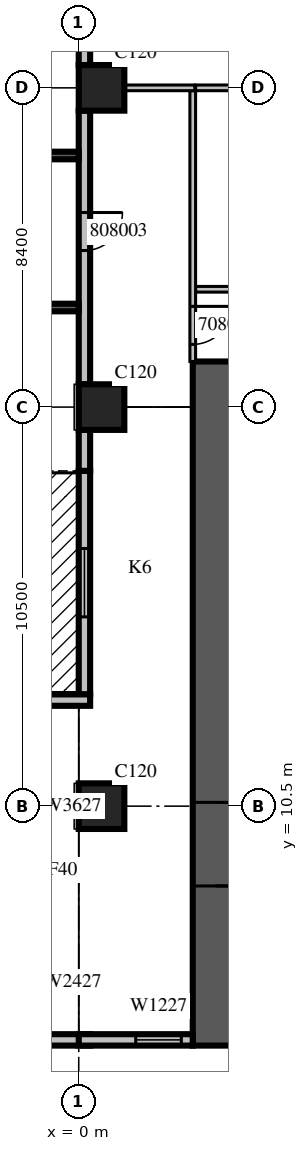
"""IFC4 building model, lengths in metres.
Left out: names, types, materials, properties, quantities, classifications, styles, units other than length and angle.
Written with IfcOpenShell. Run it as: python <this file> out.ifc"""

import sys

from ifc_helpers import new_model, si_unit, direction, frame, frame_2d, origin, origin_2d, place, context, subcontext, project, spatial, rectangle, extrude, source, transform, mapped, element, fill, save


model = new_model("IFC4")
c1 = context("Model", 3, precision=1e-05, world=origin(), true_north=direction((0.0, 1.0)))
c2 = subcontext(c1, "Body", "Model", "MODEL_VIEW")
j1 = project(units=[si_unit("LENGTHUNIT", "METRE"), si_unit("PLANEANGLEUNIT", "RADIAN")], contexts=[c1])
p1 = place(None, origin())
s1 = spatial("IfcSite", under=j1, at=p1, CompositionType="ELEMENT")
p2 = place(p1, origin())
s2 = spatial("IfcBuilding", under=s1, at=p2, CompositionType="ELEMENT")
p3 = place(p2, frame((0.0, 0.0, 44.7)))
s3 = spatial("IfcBuildingStorey", under=s2, at=p3, CompositionType="ELEMENT", Elevation=44.7)
m1 = source(origin(), c2, "Body", "SweptSolid", [
    extrude(rectangle(XDim=1.2, YDim=1.2, at=origin_2d()), origin(), (0.0, 0.0, 1.0), 4.2),
])
for number, where, z_axis, x_axis in (
    (1, (0.6, 10.5, 0.0), (0.0, 0.0, 1.0), (1.0, 0.0, 0.0)),
    (2, (0.6, 21.0, 0.0), (0.0, 0.0, 1.0), (1.0, 0.0, 0.0)),
    (3, (0.6, 29.4, 0.0), (0.0, 0.0, 1.0), (1.0, 0.0, 0.0)),
):
    element("IfcColumn", number, at=place(p3, frame(where, z_axis=z_axis, x_axis=x_axis)), inside=s3, PredefinedType="COLUMN", context=c2, shape_type="MappedRepresentation", body=[
        mapped(m1, transform((0.0, 0.0, 0.0), scale=1.0)),
    ])
m2 = source(origin(), c2, "Body", "SweptSolid", [
    extrude(rectangle(XDim=18.0, YDim=1.2, at=frame_2d((9.0, 0.0))), origin(), (0.0, 0.0, 1.0), 4.2),
])
p4 = place(p3, frame((3.6, 4.2, 0.0), z_axis=(0.0, 0.0, 1.0), x_axis=(0.0, 1.0, 0.0)))
e4 = element("IfcWall", 4, at=p4, inside=s3, PredefinedType="SHEAR", context=c2, shape_type="MappedRepresentation", body=[
    mapped(m2, transform((0.0, 0.0, 0.0), scale=1.0)),
])
m3 = source(origin(), c2, "Body", "SweptSolid", [
    extrude(rectangle(XDim=2.2, YDim=2.1, at=frame_2d((1.1, 1.05))), frame((0.0, 0.61, 0.0), z_axis=(0.0, -1.0, 0.0), x_axis=(1.0, 0.0, 0.0)), (0.0, 0.0, 1.0), 1.22),
])
p5 = place(p4, frame((4.2, 0.0, 0.0)))
e5 = element("IfcOpeningElement", 5, at=p5, cuts=e4, PredefinedType="OPENING", context=c2, shape_type="MappedRepresentation", body=[
    mapped(m3, transform((0.0, 0.0, 0.0), scale=1.0)),
])
m4 = source(origin(), c2, "Body", "SweptSolid", [
    extrude(rectangle(XDim=7.2, YDim=0.3, at=frame_2d((3.6, 0.0))), origin(), (0.0, 0.0, 1.0), 3.8),
])
p6 = place(p3, frame((0.15, 37.2, 0.0), z_axis=(0.0, 0.0, 1.0), x_axis=(0.0, -1.0, 0.0)))
e6 = element("IfcWall", 6, at=p6, inside=s3, PredefinedType="STANDARD", context=c2, shape_type="MappedRepresentation", body=[
    mapped(m4, transform((0.0, 0.0, 0.0), scale=1.0)),
])
m5 = source(origin(), c2, "Body", "SweptSolid", [
    extrude(rectangle(XDim=1.8, YDim=2.7, at=frame_2d((0.9, 1.35))), frame((0.0, 0.16, 0.0), z_axis=(0.0, -1.0, 0.0), x_axis=(1.0, 0.0, 0.0)), (0.0, 0.0, 1.0), 0.32),
])
p7 = place(p6, frame((0.738, 0.0, 0.6)))
e7 = element("IfcOpeningElement", 7, at=p7, cuts=e6, PredefinedType="OPENING", context=c2, shape_type="MappedRepresentation", body=[
    mapped(m5, transform((0.0, 0.0, 0.0), scale=1.0)),
])
m6 = source(origin(), c2, "Body", "SweptSolid", [
    extrude(rectangle(XDim=2.4, YDim=2.7, at=frame_2d((1.2, 1.35))), frame((0.0, 0.16, 0.0), z_axis=(0.0, -1.0, 0.0), x_axis=(1.0, 0.0, 0.0)), (0.0, 0.0, 1.0), 0.32),
])
p8 = place(p6, frame((3.7, 0.0, 0.6)))
e8 = element("IfcOpeningElement", 8, at=p8, cuts=e6, PredefinedType="OPENING", context=c2, shape_type="MappedRepresentation", body=[
    mapped(m6, transform((0.0, 0.0, 0.0), scale=1.0)),
])
p9 = place(p3, frame((0.15, 28.8, 0.0), z_axis=(0.0, 0.0, 1.0), x_axis=(0.0, -1.0, 0.0)))
e9 = element("IfcWall", 9, at=p9, inside=s3, PredefinedType="STANDARD", context=c2, shape_type="MappedRepresentation", body=[
    mapped(m4, transform((0.0, 0.0, 0.0), scale=1.0)),
])
m7 = source(origin(), c2, "Body", "SweptSolid", [
    extrude(rectangle(XDim=1.0, YDim=2.1, at=frame_2d((0.5, 1.05))), frame((0.0, 0.16, 0.0), z_axis=(0.0, -1.0, 0.0), x_axis=(1.0, 0.0, 0.0)), (0.0, 0.0, 1.0), 0.32),
])
p10 = place(p9, frame((2.68, 0.0, 0.0)))
e10 = element("IfcOpeningElement", 10, at=p10, cuts=e9, PredefinedType="OPENING", context=c2, shape_type="MappedRepresentation", body=[
    mapped(m7, transform((0.0, 0.0, 0.0), scale=1.0)),
])
m8 = source(origin(), c2, "Body", "SweptSolid", [
    extrude(rectangle(XDim=1.08, YDim=0.3, at=frame_2d((0.54, 0.0))), origin(), (0.0, 0.0, 1.0), 3.8),
])
p11 = place(p3, frame((0.15, 20.4, 0.0), z_axis=(0.0, 0.0, 1.0), x_axis=(0.0, -1.0, 0.0)))
e11 = element("IfcWall", 11, at=p11, inside=s3, PredefinedType="STANDARD", context=c2, shape_type="MappedRepresentation", body=[
    mapped(m8, transform((0.0, 0.0, 0.0), scale=1.0)),
])
m9 = source(origin(), c2, "Body", "SweptSolid", [
    extrude(rectangle(XDim=5.88, YDim=0.3, at=frame_2d((2.94, 0.0))), origin(), (0.0, 0.0, 1.0), 3.8),
])
p12 = place(p3, frame((0.15, 19.32, 0.0), z_axis=(0.0, 0.0, 1.0), x_axis=(0.0, -1.0, 0.0)))
e12 = element("IfcWall", 12, at=p12, inside=s3, PredefinedType="STANDARD", context=c2, shape_type="MappedRepresentation", body=[
    mapped(m9, transform((0.0, 0.0, 0.0), scale=1.0)),
])
m10 = source(origin(), c2, "Body", "SweptSolid", [
    extrude(rectangle(XDim=1.8, YDim=2.4, at=frame_2d((0.9, 1.2))), frame((0.0, 0.16, 0.0), z_axis=(0.0, -1.0, 0.0), x_axis=(1.0, 0.0, 0.0)), (0.0, 0.0, 1.0), 0.32),
])
p13 = place(p12, frame((2.04, 0.0, 0.0)))
e13 = element("IfcOpeningElement", 13, at=p13, cuts=e12, PredefinedType="OPENING", context=c2, shape_type="MappedRepresentation", body=[
    mapped(m10, transform((0.0, 0.0, 0.0), scale=1.0)),
])
m11 = source(origin(), c2, "Body", "SweptSolid", [
    extrude(rectangle(XDim=1.2, YDim=0.3, at=frame_2d((0.6, 0.0))), origin(), (0.0, 0.0, 1.0), 3.8),
])
for number, where, z_axis, x_axis in (
    (14, (0.3, 13.29, 0.0), (0.0, 0.0, 1.0), (-1.0, 0.0, 0.0)),
    (15, (0.3, 4.35, 0.0), (0.0, 0.0, 1.0), (-1.0, 0.0, 0.0)),
):
    element("IfcWall", number, at=place(p3, frame(where, z_axis=z_axis, x_axis=x_axis)), inside=s3, PredefinedType="STANDARD", context=c2, shape_type="MappedRepresentation", body=[
        mapped(m11, transform((0.0, 0.0, 0.0), scale=1.0)),
    ])
m12 = source(origin(), c2, "Body", "SweptSolid", [
    extrude(rectangle(XDim=3.0, YDim=0.3, at=frame_2d((1.5, 0.0))), origin(), (0.0, 0.0, 1.0), 3.8),
])
p14 = place(p3, frame((0.0, 4.35, 0.0), z_axis=(0.0, 0.0, 1.0), x_axis=(1.0, 0.0, 0.0)))
e16 = element("IfcWall", 16, at=p14, inside=s3, PredefinedType="STANDARD", context=c2, shape_type="MappedRepresentation", body=[
    mapped(m12, transform((0.0, 0.0, 0.0), scale=1.0)),
])
m13 = source(origin(), c2, "Body", "SweptSolid", [
    extrude(rectangle(XDim=1.2, YDim=2.7, at=frame_2d((0.6, 1.35))), frame((0.0, 0.16, 0.0), z_axis=(0.0, -1.0, 0.0), x_axis=(1.0, 0.0, 0.0)), (0.0, 0.0, 1.0), 0.32),
])
p15 = place(p14, frame((1.5, 0.0, 0.6)))
e17 = element("IfcOpeningElement", 17, at=p15, cuts=e16, PredefinedType="OPENING", context=c2, shape_type="MappedRepresentation", body=[
    mapped(m13, transform((0.0, 0.0, 0.0), scale=1.0)),
])
m14 = source(origin(), c2, "Body", "SweptSolid", [
    extrude(rectangle(XDim=3.9, YDim=0.2, at=frame_2d((1.95, 0.0))), origin(), (0.0, 0.0, 1.0), 3.79),
])
p16 = place(p3, frame((0.0, 27.62, 0.0), z_axis=(0.0, 0.0, 1.0), x_axis=(-1.0, 0.0, 0.0)))
e18 = element("IfcWall", 18, at=p16, inside=s3, PredefinedType="SOLIDWALL", context=c2, shape_type="MappedRepresentation", body=[
    mapped(m14, transform((0.0, 0.0, 0.0), scale=1.0)),
])
m15 = source(origin(), c2, "Body", "SweptSolid", [
    extrude(rectangle(XDim=2.4, YDim=2.7, at=frame_2d((1.2, 1.35))), frame((0.0, 0.11, 0.0), z_axis=(0.0, -1.0, 0.0), x_axis=(1.0, 0.0, 0.0)), (0.0, 0.0, 1.0), 0.22),
])
p17 = place(p16, frame((0.75, 0.0, 0.6)))
e19 = element("IfcOpeningElement", 19, at=p17, cuts=e18, PredefinedType="OPENING", context=c2, shape_type="MappedRepresentation", body=[
    mapped(m15, transform((0.0, 0.0, 0.0), scale=1.0)),
])
p18 = place(p3, frame((0.0, 23.62, 0.0), z_axis=(0.0, 0.0, 1.0), x_axis=(-1.0, 0.0, 0.0)))
e20 = element("IfcWall", 20, at=p18, inside=s3, PredefinedType="SOLIDWALL", context=c2, shape_type="MappedRepresentation", body=[
    mapped(m14, transform((0.0, 0.0, 0.0), scale=1.0)),
])
p19 = place(p18, frame((0.75, 0.0, 0.6)))
e21 = element("IfcOpeningElement", 21, at=p19, cuts=e20, PredefinedType="OPENING", context=c2, shape_type="MappedRepresentation", body=[
    mapped(m15, transform((0.0, 0.0, 0.0), scale=1.0)),
])
m16 = source(origin(), c2, "Body", "SweptSolid", [
    extrude(rectangle(XDim=11.925, YDim=0.15, at=frame_2d((5.963, 0.0))), origin(), (0.0, 0.0, 1.0), 3.8),
])
p20 = place(p3, frame((3.075, 24.1, 0.0), z_axis=(0.0, 0.0, 1.0), x_axis=(1.0, 0.0, 0.0)))
e22 = element("IfcWall", 22, at=p20, inside=s3, PredefinedType="PARTITIONING", context=c2, shape_type="MappedRepresentation", body=[
    mapped(m16, transform((0.0, 0.0, 0.0), scale=1.0)),
])
m17 = source(origin(), c2, "Body", "SweptSolid", [
    extrude(rectangle(XDim=0.9, YDim=2.1, at=frame_2d((0.45, 1.05))), frame((0.0, 0.085, 0.0), z_axis=(0.0, -1.0, 0.0), x_axis=(1.0, 0.0, 0.0)), (0.0, 0.0, 1.0), 0.17),
])
p21 = place(p20, frame((2.663, 0.0, 0.0)))
e23 = element("IfcOpeningElement", 23, at=p21, cuts=e22, PredefinedType="OPENING", context=c2, shape_type="MappedRepresentation", body=[
    mapped(m17, transform((0.0, 0.0, 0.0), scale=1.0)),
])
p22 = place(p20, frame((9.5, 0.0, 0.0)))
e24 = element("IfcOpeningElement", 24, at=p22, cuts=e22, PredefinedType="OPENING", context=c2, shape_type="MappedRepresentation", body=[
    mapped(m17, transform((0.0, 0.0, 0.0), scale=1.0)),
])
m18 = source(origin(), c2, "Body", "SweptSolid", [
    extrude(rectangle(XDim=6.826, YDim=0.15, at=frame_2d((3.413, 0.0))), origin(), (0.0, 0.0, 1.0), 3.8),
])
p23 = place(p3, frame((9.901, 29.4, 0.0), z_axis=(0.0, 0.0, 1.0), x_axis=(-1.0, 0.0, 0.0)))
e25 = element("IfcWall", 25, at=p23, inside=s3, PredefinedType="PARTITIONING", context=c2, shape_type="MappedRepresentation", body=[
    mapped(m18, transform((0.0, 0.0, 0.0), scale=1.0)),
])
m19 = source(origin(), c2, "Body", "SweptSolid", [
    extrude(rectangle(XDim=7.125, YDim=0.15, at=frame_2d((3.562, 0.0))), origin(), (0.0, 0.0, 1.0), 3.8),
])
p24 = place(p3, frame((3.0, 29.325, 0.0), z_axis=(0.0, 0.0, 1.0), x_axis=(0.0, -1.0, 0.0)))
e26 = element("IfcWall", 26, at=p24, inside=s3, PredefinedType="PARTITIONING", context=c2, shape_type="MappedRepresentation", body=[
    mapped(m19, transform((0.0, 0.0, 0.0), scale=1.0)),
])
m20 = source(origin(), c2, "Body", "SweptSolid", [
    extrude(rectangle(XDim=1.0, YDim=2.1, at=frame_2d((0.5, 1.05))), frame((0.0, 0.085, 0.0), z_axis=(0.0, -1.0, 0.0), x_axis=(1.0, 0.0, 0.0)), (0.0, 0.0, 1.0), 0.17),
])
p25 = place(p24, frame((5.675, 0.0, 0.0)))
e27 = element("IfcOpeningElement", 27, at=p25, cuts=e26, PredefinedType="OPENING", context=c2, shape_type="MappedRepresentation", body=[
    mapped(m20, transform((0.0, 0.0, 0.0), scale=1.0)),
])
m21 = source(origin(), c2, "Body", "SweptSolid", [
    extrude(rectangle(XDim=1.856, YDim=0.15, at=frame_2d((0.928, 0.0))), origin(), (0.0, 0.0, 1.0), 3.8),
])
p26 = place(p3, frame((3.055, 29.4, 0.0), z_axis=(0.0, 0.0, 1.0), x_axis=(-1.0, 0.0, 0.0)))
e28 = element("IfcWall", 28, at=p26, inside=s3, PredefinedType="PARTITIONING", context=c2, shape_type="MappedRepresentation", body=[
    mapped(m21, transform((0.0, 0.0, 0.0), scale=1.0)),
])
m22 = source(origin(), c2, "Body", "SweptSolid", [
    extrude(rectangle(XDim=1.8, YDim=2.4, at=frame_2d((0.9, 1.2))), frame((0.0, 0.025, 0.0), z_axis=(0.0, -1.0, 0.0), x_axis=(1.0, 0.0, 0.0)), (0.0, 0.0, 1.0), 0.05),
])
p27 = place(p13, origin())
e29 = element("IfcDoor", 29, at=p27, inside=s3, OperationType="SLIDING_TO_LEFT", PredefinedType="DOOR", context=c2, shape_type="MappedRepresentation", body=[
    mapped(m22, transform((0.0, 0.0, 0.0), scale=1.0)),
])
fill(e13, e29)
m23 = source(origin(), c2, "Body", "SweptSolid", [
    extrude(rectangle(XDim=1.2, YDim=2.7, at=frame_2d((0.6, 1.35))), frame((0.0, 0.03, 0.0), z_axis=(0.0, -1.0, 0.0), x_axis=(1.0, 0.0, 0.0)), (0.0, 0.0, 1.0), 0.06),
])
p28 = place(p15, origin())
e30 = element("IfcWindow", 30, at=p28, inside=s3, PartitioningType="SINGLE_PANEL", PredefinedType="WINDOW", context=c2, shape_type="MappedRepresentation", body=[
    mapped(m23, transform((0.0, 0.0, 0.0), scale=1.0)),
])
fill(e17, e30)
m24 = source(origin(), c2, "Body", "SweptSolid", [
    extrude(rectangle(XDim=2.2, YDim=2.1, at=frame_2d((1.1, 1.05))), frame((0.0, 0.025, 0.0), z_axis=(0.0, -1.0, 0.0), x_axis=(1.0, 0.0, 0.0)), (0.0, 0.0, 1.0), 0.05),
])
p29 = place(p5, origin())
e31 = element("IfcDoor", 31, at=p29, inside=s3, OperationType="DOUBLE_DOOR_SINGLE_SWING", PredefinedType="DOOR", context=c2, shape_type="MappedRepresentation", body=[
    mapped(m24, transform((0.0, 0.0, 0.0), scale=1.0)),
])
fill(e5, e31)
m25 = source(origin(), c2, "Body", "SweptSolid", [
    extrude(rectangle(XDim=1.0, YDim=2.1, at=frame_2d((0.5, 1.05))), frame((0.0, 0.025, 0.0), z_axis=(0.0, -1.0, 0.0), x_axis=(1.0, 0.0, 0.0)), (0.0, 0.0, 1.0), 0.05),
])
p30 = place(p25, origin())
e32 = element("IfcDoor", 32, at=p30, inside=s3, OperationType="SINGLE_SWING_LEFT", PredefinedType="DOOR", context=c2, shape_type="MappedRepresentation", body=[
    mapped(m25, transform((0.0, 0.0, 0.0), scale=1.0)),
])
fill(e27, e32)
p31 = place(p10, origin())
e33 = element("IfcDoor", 33, at=p31, inside=s3, OperationType="SINGLE_SWING_LEFT", PredefinedType="DOOR", context=c2, shape_type="MappedRepresentation", body=[
    mapped(m25, transform((0.0, 0.0, 0.0), scale=1.0)),
])
fill(e10, e33)
save(model, sys.argv[1])
